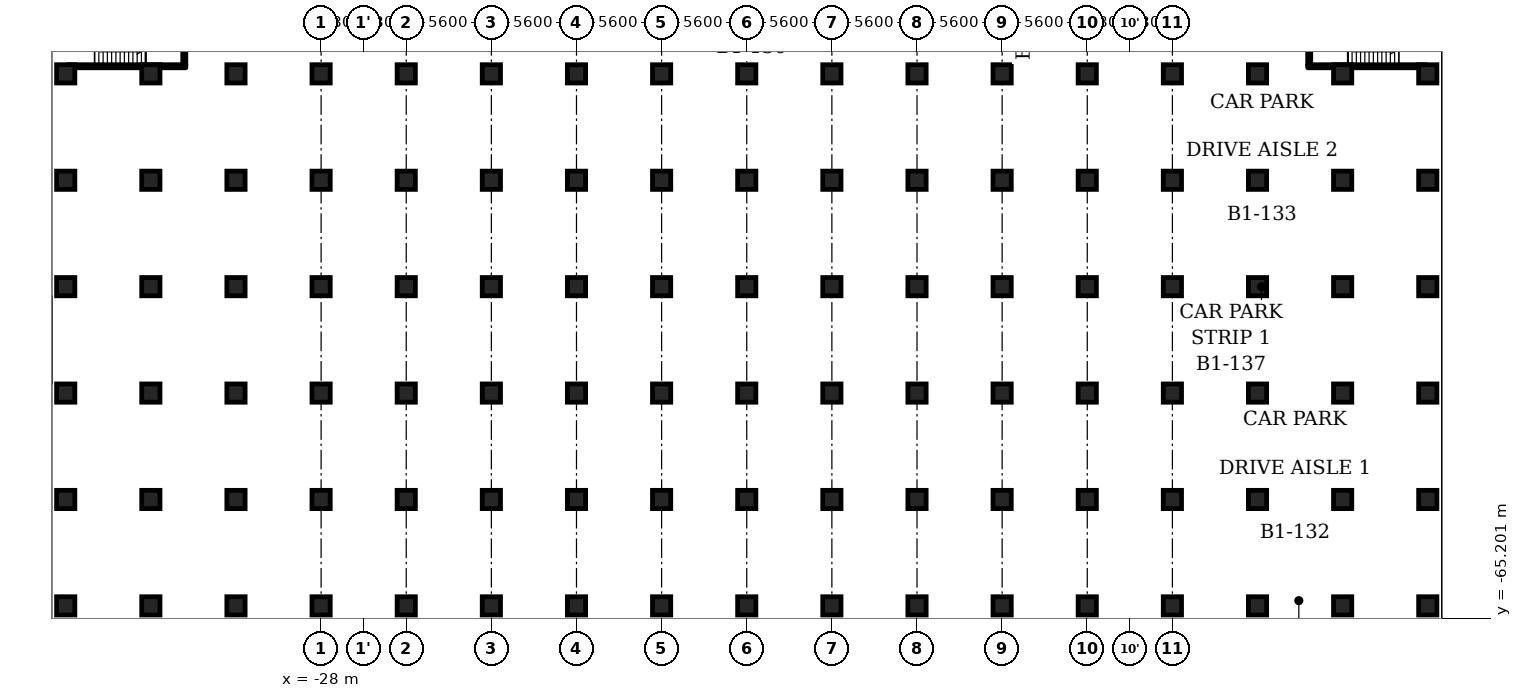
"""IFC4 building model, lengths in metres.
Left out: names, types, materials, properties, quantities, classifications, styles, units other than length and angle.
Written with IfcOpenShell. Run it as: python <this file> out.ifc"""

import sys

from ifc_helpers import new_model, si_unit, direction, frame, frame_2d, origin, origin_2d, place, context, subcontext, project, spatial, rectangle, circle, extrude, element, save


model = new_model("IFC4")
c1 = context("Model", 3, precision=1e-05, world=origin(), true_north=direction((0.0, 1.0)))
c2 = subcontext(c1, "Body", "Model", "MODEL_VIEW")
j1 = project(units=[si_unit("LENGTHUNIT", "METRE"), si_unit("PLANEANGLEUNIT", "RADIAN")], contexts=[c1])
p1 = place(None, origin())
s1 = spatial("IfcSite", under=j1, at=p1, CompositionType="ELEMENT")
p2 = place(p1, origin())
s2 = spatial("IfcBuilding", under=s1, at=p2, CompositionType="ELEMENT")
p3 = place(p2, frame((0.0, 0.0, -4.5)))
s3 = spatial("IfcBuildingStorey", under=s2, at=p3, CompositionType="ELEMENT", Elevation=-4.5)
for number, where, z_axis, x_axis in (
    (1, (-44.8, -29.4, 0.0), (0.0, 0.0, 1.0), (1.0, 0.0, 0.0)),
    (2, (-39.2, -29.4, 0.0), (0.0, 0.0, 1.0), (1.0, 0.0, 0.0)),
    (3, (-33.6, -29.4, 0.0), (0.0, 0.0, 1.0), (1.0, 0.0, 0.0)),
    (4, (-28.0, -29.4, 0.0), (0.0, 0.0, 1.0), (1.0, 0.0, 0.0)),
    (5, (-22.4, -29.4, 0.0), (0.0, 0.0, 1.0), (1.0, 0.0, 0.0)),
    (6, (-16.8, -29.4, 0.0), (0.0, 0.0, 1.0), (1.0, 0.0, 0.0)),
    (7, (-11.2, -29.4, 0.0), (0.0, 0.0, 1.0), (1.0, 0.0, 0.0)),
    (8, (-5.6, -29.4, 0.0), (0.0, 0.0, 1.0), (1.0, 0.0, 0.0)),
    (9, (0.0, -29.4, 0.0), (0.0, 0.0, 1.0), (1.0, 0.0, 0.0)),
    (10, (5.6, -29.4, 0.0), (0.0, 0.0, 1.0), (1.0, 0.0, 0.0)),
    (11, (11.2, -29.4, 0.0), (0.0, 0.0, 1.0), (1.0, 0.0, 0.0)),
    (12, (16.8, -29.4, 0.0), (0.0, 0.0, 1.0), (1.0, 0.0, 0.0)),
    (13, (22.4, -29.4, 0.0), (0.0, 0.0, 1.0), (1.0, 0.0, 0.0)),
    (14, (28.0, -29.4, 0.0), (0.0, 0.0, 1.0), (1.0, 0.0, 0.0)),
    (15, (33.6, -29.4, 0.0), (0.0, 0.0, 1.0), (1.0, 0.0, 0.0)),
    (16, (39.2, -29.4, 0.0), (0.0, 0.0, 1.0), (1.0, 0.0, 0.0)),
    (17, (44.8, -29.4, 0.0), (0.0, 0.0, 1.0), (1.0, 0.0, 0.0)),
    (18, (-44.8, -36.4, 0.0), (0.0, 0.0, 1.0), (1.0, 0.0, 0.0)),
    (19, (-39.2, -36.4, 0.0), (0.0, 0.0, 1.0), (1.0, 0.0, 0.0)),
    (20, (-33.6, -36.4, 0.0), (0.0, 0.0, 1.0), (1.0, 0.0, 0.0)),
    (21, (-28.0, -36.4, 0.0), (0.0, 0.0, 1.0), (1.0, 0.0, 0.0)),
    (22, (-22.4, -36.4, 0.0), (0.0, 0.0, 1.0), (1.0, 0.0, 0.0)),
    (23, (-16.8, -36.4, 0.0), (0.0, 0.0, 1.0), (1.0, 0.0, 0.0)),
    (24, (-11.2, -36.4, 0.0), (0.0, 0.0, 1.0), (1.0, 0.0, 0.0)),
    (25, (-5.6, -36.4, 0.0), (0.0, 0.0, 1.0), (1.0, 0.0, 0.0)),
    (26, (0.0, -36.4, 0.0), (0.0, 0.0, 1.0), (1.0, 0.0, 0.0)),
    (27, (5.6, -36.4, 0.0), (0.0, 0.0, 1.0), (1.0, 0.0, 0.0)),
    (28, (11.2, -36.4, 0.0), (0.0, 0.0, 1.0), (1.0, 0.0, 0.0)),
    (29, (16.8, -36.4, 0.0), (0.0, 0.0, 1.0), (1.0, 0.0, 0.0)),
    (30, (22.4, -36.4, 0.0), (0.0, 0.0, 1.0), (1.0, 0.0, 0.0)),
    (31, (28.0, -36.4, 0.0), (0.0, 0.0, 1.0), (1.0, 0.0, 0.0)),
    (32, (33.6, -36.4, 0.0), (0.0, 0.0, 1.0), (1.0, 0.0, 0.0)),
    (33, (39.2, -36.4, 0.0), (0.0, 0.0, 1.0), (1.0, 0.0, 0.0)),
    (34, (44.8, -36.4, 0.0), (0.0, 0.0, 1.0), (1.0, 0.0, 0.0)),
    (35, (-44.8, -43.4, 0.0), (0.0, 0.0, 1.0), (1.0, 0.0, 0.0)),
    (36, (-39.2, -43.4, 0.0), (0.0, 0.0, 1.0), (1.0, 0.0, 0.0)),
    (37, (-33.6, -43.4, 0.0), (0.0, 0.0, 1.0), (1.0, 0.0, 0.0)),
    (38, (-28.0, -43.4, 0.0), (0.0, 0.0, 1.0), (1.0, 0.0, 0.0)),
    (39, (-22.4, -43.4, 0.0), (0.0, 0.0, 1.0), (1.0, 0.0, 0.0)),
    (40, (-16.8, -43.4, 0.0), (0.0, 0.0, 1.0), (1.0, 0.0, 0.0)),
    (41, (-11.2, -43.4, 0.0), (0.0, 0.0, 1.0), (1.0, 0.0, 0.0)),
    (42, (-5.6, -43.4, 0.0), (0.0, 0.0, 1.0), (1.0, 0.0, 0.0)),
    (43, (0.0, -43.4, 0.0), (0.0, 0.0, 1.0), (1.0, 0.0, 0.0)),
    (44, (5.6, -43.4, 0.0), (0.0, 0.0, 1.0), (1.0, 0.0, 0.0)),
    (45, (11.2, -43.4, 0.0), (0.0, 0.0, 1.0), (1.0, 0.0, 0.0)),
    (46, (16.8, -43.4, 0.0), (0.0, 0.0, 1.0), (1.0, 0.0, 0.0)),
    (47, (22.4, -43.4, 0.0), (0.0, 0.0, 1.0), (1.0, 0.0, 0.0)),
    (48, (28.0, -43.4, 0.0), (0.0, 0.0, 1.0), (1.0, 0.0, 0.0)),
    (49, (33.6, -43.4, 0.0), (0.0, 0.0, 1.0), (1.0, 0.0, 0.0)),
    (50, (39.2, -43.4, 0.0), (0.0, 0.0, 1.0), (1.0, 0.0, 0.0)),
    (51, (44.8, -43.4, 0.0), (0.0, 0.0, 1.0), (1.0, 0.0, 0.0)),
    (52, (-44.8, -50.4, 0.0), (0.0, 0.0, 1.0), (1.0, 0.0, 0.0)),
    (53, (-39.2, -50.4, 0.0), (0.0, 0.0, 1.0), (1.0, 0.0, 0.0)),
    (54, (-33.6, -50.4, 0.0), (0.0, 0.0, 1.0), (1.0, 0.0, 0.0)),
    (55, (-28.0, -50.4, 0.0), (0.0, 0.0, 1.0), (1.0, 0.0, 0.0)),
    (56, (-22.4, -50.4, 0.0), (0.0, 0.0, 1.0), (1.0, 0.0, 0.0)),
    (57, (-16.8, -50.4, 0.0), (0.0, 0.0, 1.0), (1.0, 0.0, 0.0)),
    (58, (-11.2, -50.4, 0.0), (0.0, 0.0, 1.0), (1.0, 0.0, 0.0)),
    (59, (-5.6, -50.4, 0.0), (0.0, 0.0, 1.0), (1.0, 0.0, 0.0)),
    (60, (0.0, -50.4, 0.0), (0.0, 0.0, 1.0), (1.0, 0.0, 0.0)),
    (61, (5.6, -50.4, 0.0), (0.0, 0.0, 1.0), (1.0, 0.0, 0.0)),
    (62, (11.2, -50.4, 0.0), (0.0, 0.0, 1.0), (1.0, 0.0, 0.0)),
    (63, (16.8, -50.4, 0.0), (0.0, 0.0, 1.0), (1.0, 0.0, 0.0)),
    (64, (22.4, -50.4, 0.0), (0.0, 0.0, 1.0), (1.0, 0.0, 0.0)),
    (65, (28.0, -50.4, 0.0), (0.0, 0.0, 1.0), (1.0, 0.0, 0.0)),
    (66, (33.6, -50.4, 0.0), (0.0, 0.0, 1.0), (1.0, 0.0, 0.0)),
    (67, (39.2, -50.4, 0.0), (0.0, 0.0, 1.0), (1.0, 0.0, 0.0)),
    (68, (44.8, -50.4, 0.0), (0.0, 0.0, 1.0), (1.0, 0.0, 0.0)),
    (69, (-44.8, -57.4, 0.0), (0.0, 0.0, 1.0), (1.0, 0.0, 0.0)),
    (70, (-39.2, -57.4, 0.0), (0.0, 0.0, 1.0), (1.0, 0.0, 0.0)),
    (71, (-33.6, -57.4, 0.0), (0.0, 0.0, 1.0), (1.0, 0.0, 0.0)),
    (72, (-28.0, -57.4, 0.0), (0.0, 0.0, 1.0), (1.0, 0.0, 0.0)),
    (73, (-22.4, -57.4, 0.0), (0.0, 0.0, 1.0), (1.0, 0.0, 0.0)),
    (74, (-16.8, -57.4, 0.0), (0.0, 0.0, 1.0), (1.0, 0.0, 0.0)),
    (75, (-11.2, -57.4, 0.0), (0.0, 0.0, 1.0), (1.0, 0.0, 0.0)),
    (76, (-5.6, -57.4, 0.0), (0.0, 0.0, 1.0), (1.0, 0.0, 0.0)),
    (77, (0.0, -57.4, 0.0), (0.0, 0.0, 1.0), (1.0, 0.0, 0.0)),
    (78, (5.6, -57.4, 0.0), (0.0, 0.0, 1.0), (1.0, 0.0, 0.0)),
    (79, (11.2, -57.4, 0.0), (0.0, 0.0, 1.0), (1.0, 0.0, 0.0)),
    (80, (16.8, -57.4, 0.0), (0.0, 0.0, 1.0), (1.0, 0.0, 0.0)),
    (81, (22.4, -57.4, 0.0), (0.0, 0.0, 1.0), (1.0, 0.0, 0.0)),
    (82, (28.0, -57.4, 0.0), (0.0, 0.0, 1.0), (1.0, 0.0, 0.0)),
    (83, (33.6, -57.4, 0.0), (0.0, 0.0, 1.0), (1.0, 0.0, 0.0)),
    (84, (39.2, -57.4, 0.0), (0.0, 0.0, 1.0), (1.0, 0.0, 0.0)),
    (85, (44.8, -57.4, 0.0), (0.0, 0.0, 1.0), (1.0, 0.0, 0.0)),
    (86, (-44.8, -64.4, 0.0), (0.0, 0.0, 1.0), (1.0, 0.0, 0.0)),
    (87, (-39.2, -64.4, 0.0), (0.0, 0.0, 1.0), (1.0, 0.0, 0.0)),
    (88, (-33.6, -64.4, 0.0), (0.0, 0.0, 1.0), (1.0, 0.0, 0.0)),
    (89, (-28.0, -64.4, 0.0), (0.0, 0.0, 1.0), (1.0, 0.0, 0.0)),
    (90, (-22.4, -64.4, 0.0), (0.0, 0.0, 1.0), (1.0, 0.0, 0.0)),
    (91, (-16.8, -64.4, 0.0), (0.0, 0.0, 1.0), (1.0, 0.0, 0.0)),
    (92, (-11.2, -64.4, 0.0), (0.0, 0.0, 1.0), (1.0, 0.0, 0.0)),
    (93, (-5.6, -64.4, 0.0), (0.0, 0.0, 1.0), (1.0, 0.0, 0.0)),
    (94, (0.0, -64.4, 0.0), (0.0, 0.0, 1.0), (1.0, 0.0, 0.0)),
    (95, (5.6, -64.4, 0.0), (0.0, 0.0, 1.0), (1.0, 0.0, 0.0)),
    (96, (11.2, -64.4, 0.0), (0.0, 0.0, 1.0), (1.0, 0.0, 0.0)),
    (97, (16.8, -64.4, 0.0), (0.0, 0.0, 1.0), (1.0, 0.0, 0.0)),
    (98, (22.4, -64.4, 0.0), (0.0, 0.0, 1.0), (1.0, 0.0, 0.0)),
    (99, (28.0, -64.4, 0.0), (0.0, 0.0, 1.0), (1.0, 0.0, 0.0)),
    (100, (33.6, -64.4, 0.0), (0.0, 0.0, 1.0), (1.0, 0.0, 0.0)),
    (101, (39.2, -64.4, 0.0), (0.0, 0.0, 1.0), (1.0, 0.0, 0.0)),
    (102, (44.8, -64.4, 0.0), (0.0, 0.0, 1.0), (1.0, 0.0, 0.0)),
):
    element("IfcColumn", number, at=place(p3, frame(where, z_axis=z_axis, x_axis=x_axis)), inside=s3, PredefinedType="COLUMN", context=c2, shape_type="SweptSolid", body=[
        extrude(circle(Radius=0.6, at=origin_2d()), origin(), (0.0, 0.0, 1.0), 4.5),
    ])
for number, where, z_axis, x_axis in (
    (103, (-44.71, -28.9, 0.0), (0.0, 0.0, 1.0), (1.0, 0.0, 0.0)),
    (104, (36.9, -28.9, 0.0), (0.0, 0.0, 1.0), (1.0, 0.0, 0.0)),
):
    element("IfcWall", number, at=place(p3, frame(where, z_axis=z_axis, x_axis=x_axis)), inside=s3, PredefinedType="SHEAR", context=c2, shape_type="SweptSolid", body=[
        extrude(rectangle(XDim=7.81, YDim=0.2, at=frame_2d((3.905, 0.0))), origin(), (0.0, 0.0, 1.0), 4.05),
    ])
for number, where, z_axis, x_axis in (
    (105, (-37.0, -28.8, 0.0), (0.0, 0.0, 1.0), (0.0, 1.0, 0.0)),
    (106, (37.0, -28.8, 0.0), (0.0, 0.0, 1.0), (0.0, 1.0, 0.0)),
):
    element("IfcWall", number, at=place(p3, frame(where, z_axis=z_axis, x_axis=x_axis)), inside=s3, PredefinedType="SHEAR", context=c2, shape_type="SweptSolid", body=[
        extrude(rectangle(XDim=3.9, YDim=0.2, at=frame_2d((1.95, 0.0))), origin(), (0.0, 0.0, 1.0), 4.05),
    ])
save(model, sys.argv[1])
